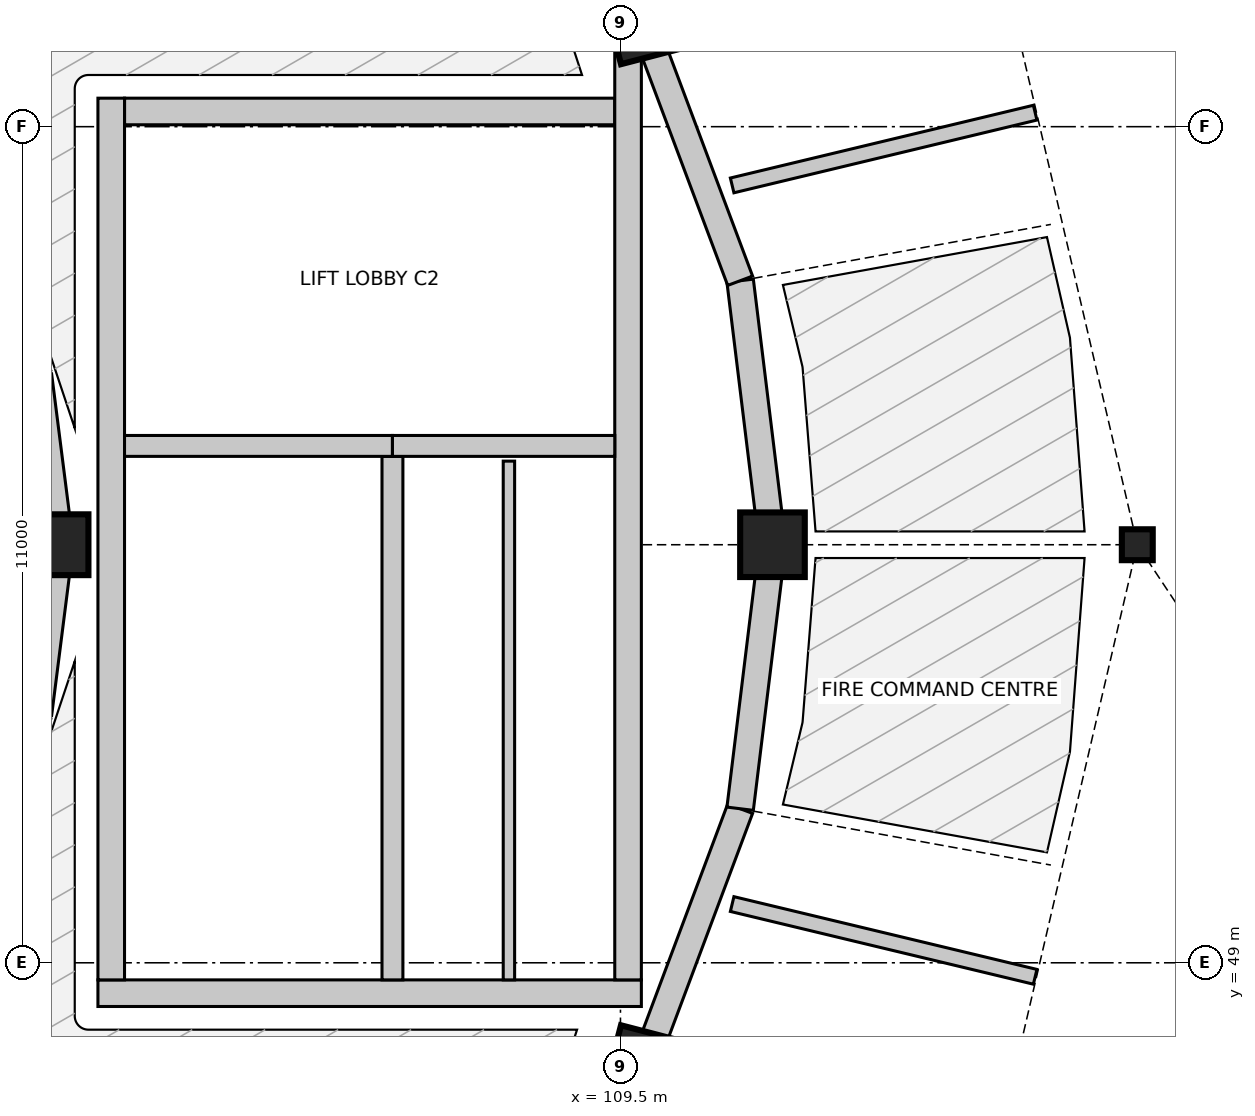
"""IFC4 building model, lengths in metres.
Left out: names, types, materials, properties, quantities, classifications, styles, units other than length and angle.
Written with IfcOpenShell. Run it as: python <this file> out.ifc"""

import sys

from ifc_helpers import new_model, si_unit, direction, frame, frame_2d, origin, origin_2d, place, context, subcontext, project, spatial, rectangle, circle, hollow_circle, extrude, element, fill, save


model = new_model("IFC4")
c1 = context("Model", 3, precision=1e-05, world=origin(), true_north=direction((0.0, 1.0)))
c2 = subcontext(c1, "Body", "Model", "MODEL_VIEW")
j1 = project(units=[si_unit("LENGTHUNIT", "METRE"), si_unit("PLANEANGLEUNIT", "RADIAN")], contexts=[c1])
p1 = place(None, origin())
s1 = spatial("IfcSite", under=j1, at=p1, CompositionType="ELEMENT")
p2 = place(p1, origin())
s2 = spatial("IfcBuilding", under=s1, at=p2, CompositionType="ELEMENT")
p3 = place(p2, origin())
s3 = spatial("IfcBuildingStorey", under=s2, at=p3, CompositionType="ELEMENT", Elevation=0.0)
p4 = place(p3, frame((116.3, 54.5, 0.0), z_axis=(0.0, 0.0, 1.0), x_axis=(1.0, 0.0, 0.0)))
e1 = element("IfcColumn", 1, at=p4, inside=s3, PredefinedType="COLUMN", context=c2, shape_type="SweptSolid", body=[
    extrude(hollow_circle(Radius=0.203, WallThickness=0.025, at=origin_2d()), origin(), (0.0, 0.0, 1.0), 4.8),
])
for number, where, z_axis, x_axis in (
    (2, (111.5, 54.5, 0.0), (0.0, 0.0, 1.0), (1.0, 0.0, 0.0)),
    (3, (109.811, 61.34, 0.0), (0.0, 0.0, 1.0), (0.968, 0.252, 0.0)),
    (4, (109.811, 47.66, 0.0), (0.0, 0.0, 1.0), (0.968, -0.252, 0.0)),
):
    element("IfcColumn", number, at=place(p3, frame(where, z_axis=z_axis, x_axis=x_axis)), inside=s3, PredefinedType="COLUMN", context=c2, shape_type="SweptSolid", body=[
        extrude(rectangle(XDim=0.85, YDim=0.85, at=origin_2d()), origin(), (0.0, 0.0, 1.0), 4.8),
    ])
p5 = place(p3, frame((102.1, 54.5, 0.0), z_axis=(0.0, 0.0, 1.0), x_axis=(1.0, 0.0, 0.0)))
e5 = element("IfcColumn", 5, at=p5, inside=s3, PredefinedType="COLUMN", context=c2, shape_type="SweptSolid", body=[
    extrude(circle(Radius=0.4, at=origin_2d()), origin(), (0.0, 0.0, 1.0), 4.8),
])
p6 = place(p3, frame((111.5, 54.5, 0.0), z_axis=(0.0, 0.0, 1.0), x_axis=(-0.121552414401, 0.99258501427, 0.0)))
e6 = element("IfcWall", 6, at=p6, inside=s3, PredefinedType="SHEAR", context=c2, shape_type="SweptSolid", body=[
    extrude(rectangle(XDim=3.499, YDim=0.35, at=frame_2d((1.75, 0.0))), origin(), (0.0, 0.0, 1.0), 4.52),
])
for number, where, z_axis, x_axis in (
    (7, (111.075, 57.973, 0.0), (0.0, 0.0, 1.0), (-0.351, 0.936, 0.0)),
    (8, (109.811, 47.66, 0.0), (0.0, 0.0, 1.0), (0.351, 0.936, 0.0)),
):
    element("IfcWall", number, at=place(p3, frame(where, z_axis=z_axis, x_axis=x_axis)), inside=s3, PredefinedType="SHEAR", context=c2, shape_type="SweptSolid", body=[
        extrude(rectangle(XDim=3.597, YDim=0.35, at=frame_2d((1.798, 0.0))), origin(), (0.0, 0.0, 1.0), 4.52),
    ])
p7 = place(p3, frame((111.075, 51.027, 0.0), z_axis=(0.0, 0.0, 1.0), x_axis=(0.121552414401, 0.99258501427, 0.0)))
e9 = element("IfcWall", 9, at=p7, inside=s3, PredefinedType="SHEAR", context=c2, shape_type="SweptSolid", body=[
    extrude(rectangle(XDim=3.499, YDim=0.35, at=frame_2d((1.75, 0.0))), origin(), (0.0, 0.0, 1.0), 4.52),
])
for number, where, z_axis, x_axis in (
    (10, (102.1, 54.5, 0.0), (0.0, 0.0, 1.0), (-0.126, 0.992, 0.0)),
    (11, (101.817, 52.277, 0.0), (0.0, 0.0, 1.0), (0.126, 0.992, 0.0)),
):
    element("IfcWall", number, at=place(p3, frame(where, z_axis=z_axis, x_axis=x_axis)), inside=s3, PredefinedType="SOLIDWALL", context=c2, shape_type="SweptSolid", body=[
        extrude(rectangle(XDim=2.24, YDim=0.4, at=frame_2d((1.12, 0.0))), origin(), (0.0, 0.0, 1.0), 4.52),
    ])
p8 = place(p3, frame((102.625, 48.6, 0.0), z_axis=(0.0, 0.0, 1.0), x_axis=(1.0, 0.0, 0.0)))
e12 = element("IfcWall", 12, at=p8, inside=s3, PredefinedType="SHEAR", context=c2, shape_type="SweptSolid", body=[
    extrude(rectangle(XDim=7.15, YDim=0.35, at=frame_2d((3.575, 0.0))), origin(), (0.0, 0.0, 1.0), 4.52),
])
p9 = place(p3, frame((102.975, 60.2, 0.0), z_axis=(0.0, 0.0, 1.0), x_axis=(1.0, 0.0, 0.0)))
e13 = element("IfcWall", 13, at=p9, inside=s3, PredefinedType="SHEAR", context=c2, shape_type="SweptSolid", body=[
    extrude(rectangle(XDim=6.45, YDim=0.35, at=frame_2d((3.225, 0.0))), origin(), (0.0, 0.0, 1.0), 4.52),
])
p10 = place(p9, frame((2.5, 0.0, 0.0)))
e14 = element("IfcOpeningElement", 14, at=p10, cuts=e13, PredefinedType="OPENING", context=c2, shape_type="SweptSolid", body=[
    extrude(rectangle(XDim=1.45, YDim=2.2, at=frame_2d((0.725, 1.1))), frame((0.0, 0.185, 0.0), z_axis=(0.0, -1.0, 0.0), x_axis=(1.0, 0.0, 0.0)), (0.0, 0.0, 1.0), 0.37),
])
p11 = place(p3, frame((102.8, 48.775, 0.0), z_axis=(0.0, 0.0, 1.0), x_axis=(0.0, 1.0, 0.0)))
e15 = element("IfcWall", 15, at=p11, inside=s3, PredefinedType="SHEAR", context=c2, shape_type="SweptSolid", body=[
    extrude(rectangle(XDim=11.6, YDim=0.35, at=frame_2d((5.8, 0.0))), origin(), (0.0, 0.0, 1.0), 4.52),
])
p12 = place(p3, frame((109.6, 48.775, 0.0), z_axis=(0.0, 0.0, 1.0), x_axis=(0.0, 1.0, 0.0)))
e16 = element("IfcWall", 16, at=p12, inside=s3, PredefinedType="SHEAR", context=c2, shape_type="SweptSolid", body=[
    extrude(rectangle(XDim=12.565, YDim=0.35, at=frame_2d((6.283, 0.0))), origin(), (0.0, 0.0, 1.0), 4.52),
])
p13 = place(p3, frame((106.5, 48.775, 0.0), z_axis=(0.0, 0.0, 1.0), x_axis=(0.0, 1.0, 0.0)))
e17 = element("IfcWall", 17, at=p13, inside=s3, PredefinedType="SHEAR", context=c2, shape_type="SweptSolid", body=[
    extrude(rectangle(XDim=6.888, YDim=0.275, at=frame_2d((3.444, 0.0))), origin(), (0.0, 0.0, 1.0), 4.52),
])
p14 = place(p3, frame((102.975, 55.8, 0.0), z_axis=(0.0, 0.0, 1.0), x_axis=(1.0, 0.0, 0.0)))
e18 = element("IfcWall", 18, at=p14, inside=s3, PredefinedType="SHEAR", context=c2, shape_type="SweptSolid", body=[
    extrude(rectangle(XDim=3.525, YDim=0.275, at=frame_2d((1.762, 0.0))), origin(), (0.0, 0.0, 1.0), 4.52),
])
p15 = place(p14, frame((1.785, 0.0, 0.0)))
e19 = element("IfcOpeningElement", 19, at=p15, cuts=e18, PredefinedType="OPENING", context=c2, shape_type="SweptSolid", body=[
    extrude(rectangle(XDim=1.25, YDim=2.15, at=frame_2d((0.625, 1.075))), frame((0.0, 0.147, 0.0), z_axis=(0.0, -1.0, 0.0), x_axis=(1.0, 0.0, 0.0)), (0.0, 0.0, 1.0), 0.295),
])
p16 = place(p3, frame((106.5, 55.8, 0.0), z_axis=(0.0, 0.0, 1.0), x_axis=(1.0, 0.0, 0.0)))
e20 = element("IfcWall", 20, at=p16, inside=s3, PredefinedType="SHEAR", context=c2, shape_type="SweptSolid", body=[
    extrude(rectangle(XDim=2.925, YDim=0.275, at=frame_2d((1.462, 0.0))), origin(), (0.0, 0.0, 1.0), 4.52),
])
p17 = place(p16, frame((0.32, 0.0, 0.0)))
e21 = element("IfcOpeningElement", 21, at=p17, cuts=e20, PredefinedType="OPENING", context=c2, shape_type="SweptSolid", body=[
    extrude(rectangle(XDim=1.1, YDim=2.15, at=frame_2d((0.55, 1.075))), frame((0.0, 0.147, 0.0), z_axis=(0.0, -1.0, 0.0), x_axis=(1.0, 0.0, 0.0)), (0.0, 0.0, 1.0), 0.295),
])
p18 = place(p16, frame((1.645, 0.0, 0.0)))
e22 = element("IfcOpeningElement", 22, at=p18, cuts=e20, PredefinedType="OPENING", context=c2, shape_type="SweptSolid", body=[
    extrude(rectangle(XDim=1.1, YDim=2.15, at=frame_2d((0.55, 1.075))), frame((0.0, 0.147, 0.0), z_axis=(0.0, -1.0, 0.0), x_axis=(1.0, 0.0, 0.0)), (0.0, 0.0, 1.0), 0.295),
])
p19 = place(p3, frame((108.032, 48.775, 0.0), z_axis=(0.0, 0.0, 1.0), x_axis=(0.0, 1.0, 0.0)))
e23 = element("IfcWall", 23, at=p19, inside=s3, PredefinedType="PARTITIONING", context=c2, shape_type="SweptSolid", body=[
    extrude(rectangle(XDim=6.825, YDim=0.15, at=frame_2d((3.413, 0.0))), origin(), (0.0, 0.0, 1.0), 4.514),
])
p20 = place(p3, frame((110.969, 49.773, 0.0), z_axis=(0.0, 0.0, 1.0), x_axis=(0.972376490879, -0.233417994136, 0.0)))
e24 = element("IfcWall", 24, at=p20, inside=s3, PredefinedType="PARTITIONING", context=c2, shape_type="SweptSolid", body=[
    extrude(rectangle(XDim=4.1, YDim=0.2, at=frame_2d((2.05, 0.0))), origin(), (0.0, 0.0, 1.0), 4.16),
])
p21 = place(p20, frame((1.375, 0.0, 0.0)))
e25 = element("IfcOpeningElement", 25, at=p21, cuts=e24, PredefinedType="OPENING", context=c2, shape_type="SweptSolid", body=[
    extrude(rectangle(XDim=1.35, YDim=2.2, at=frame_2d((0.675, 1.1))), frame((0.0, 0.11, 0.0), z_axis=(0.0, -1.0, 0.0), x_axis=(1.0, 0.0, 0.0)), (0.0, 0.0, 1.0), 0.22),
])
p22 = place(p3, frame((110.969, 59.227, 0.0), z_axis=(0.0, 0.0, 1.0), x_axis=(0.972376490879, 0.233417994136, 0.0)))
e26 = element("IfcWall", 26, at=p22, inside=s3, PredefinedType="PARTITIONING", context=c2, shape_type="SweptSolid", body=[
    extrude(rectangle(XDim=4.1, YDim=0.2, at=frame_2d((2.05, 0.0))), origin(), (0.0, 0.0, 1.0), 4.16),
])
p23 = place(p15, origin())
e27 = element("IfcDoor", 27, at=p23, inside=s3, OperationType="SINGLE_SWING_RIGHT", PredefinedType="DOOR", context=c2, shape_type="SweptSolid", body=[
    extrude(rectangle(XDim=1.25, YDim=2.15, at=frame_2d((0.625, 1.075))), frame((0.0, 0.025, 0.0), z_axis=(0.0, -1.0, 0.0), x_axis=(1.0, 0.0, 0.0)), (0.0, 0.0, 1.0), 0.05),
])
fill(e19, e27)
p24 = place(p17, origin())
e28 = element("IfcDoor", 28, at=p24, inside=s3, OperationType="DOUBLE_DOOR_SLIDING", PredefinedType="DOOR", context=c2, shape_type="SweptSolid", body=[
    extrude(rectangle(XDim=1.1, YDim=2.15, at=frame_2d((0.55, 1.075))), frame((0.0, 0.025, 0.0), z_axis=(0.0, -1.0, 0.0), x_axis=(1.0, 0.0, 0.0)), (0.0, 0.0, 1.0), 0.05),
])
fill(e21, e28)
p25 = place(p18, origin())
e29 = element("IfcDoor", 29, at=p25, inside=s3, OperationType="DOUBLE_DOOR_SLIDING", PredefinedType="DOOR", context=c2, shape_type="SweptSolid", body=[
    extrude(rectangle(XDim=1.1, YDim=2.15, at=frame_2d((0.55, 1.075))), frame((0.0, 0.025, 0.0), z_axis=(0.0, -1.0, 0.0), x_axis=(1.0, 0.0, 0.0)), (0.0, 0.0, 1.0), 0.05),
])
fill(e22, e29)
p26 = place(p10, origin())
e30 = element("IfcDoor", 30, at=p26, inside=s3, OperationType="SINGLE_SWING_LEFT", PredefinedType="DOOR", context=c2, shape_type="SweptSolid", body=[
    extrude(rectangle(XDim=1.45, YDim=2.2, at=frame_2d((0.725, 1.1))), frame((0.0, 0.025, 0.0), z_axis=(0.0, -1.0, 0.0), x_axis=(1.0, 0.0, 0.0)), (0.0, 0.0, 1.0), 0.05),
])
fill(e14, e30)
p27 = place(p21, origin())
e31 = element("IfcDoor", 31, at=p27, inside=s3, OperationType="SINGLE_SWING_LEFT", PredefinedType="DOOR", context=c2, shape_type="SweptSolid", body=[
    extrude(rectangle(XDim=1.35, YDim=2.2, at=frame_2d((0.675, 1.1))), frame((0.0, 0.025, 0.0), z_axis=(0.0, -1.0, 0.0), x_axis=(1.0, 0.0, 0.0)), (0.0, 0.0, 1.0), 0.05),
])
fill(e25, e31)
save(model, sys.argv[1])
